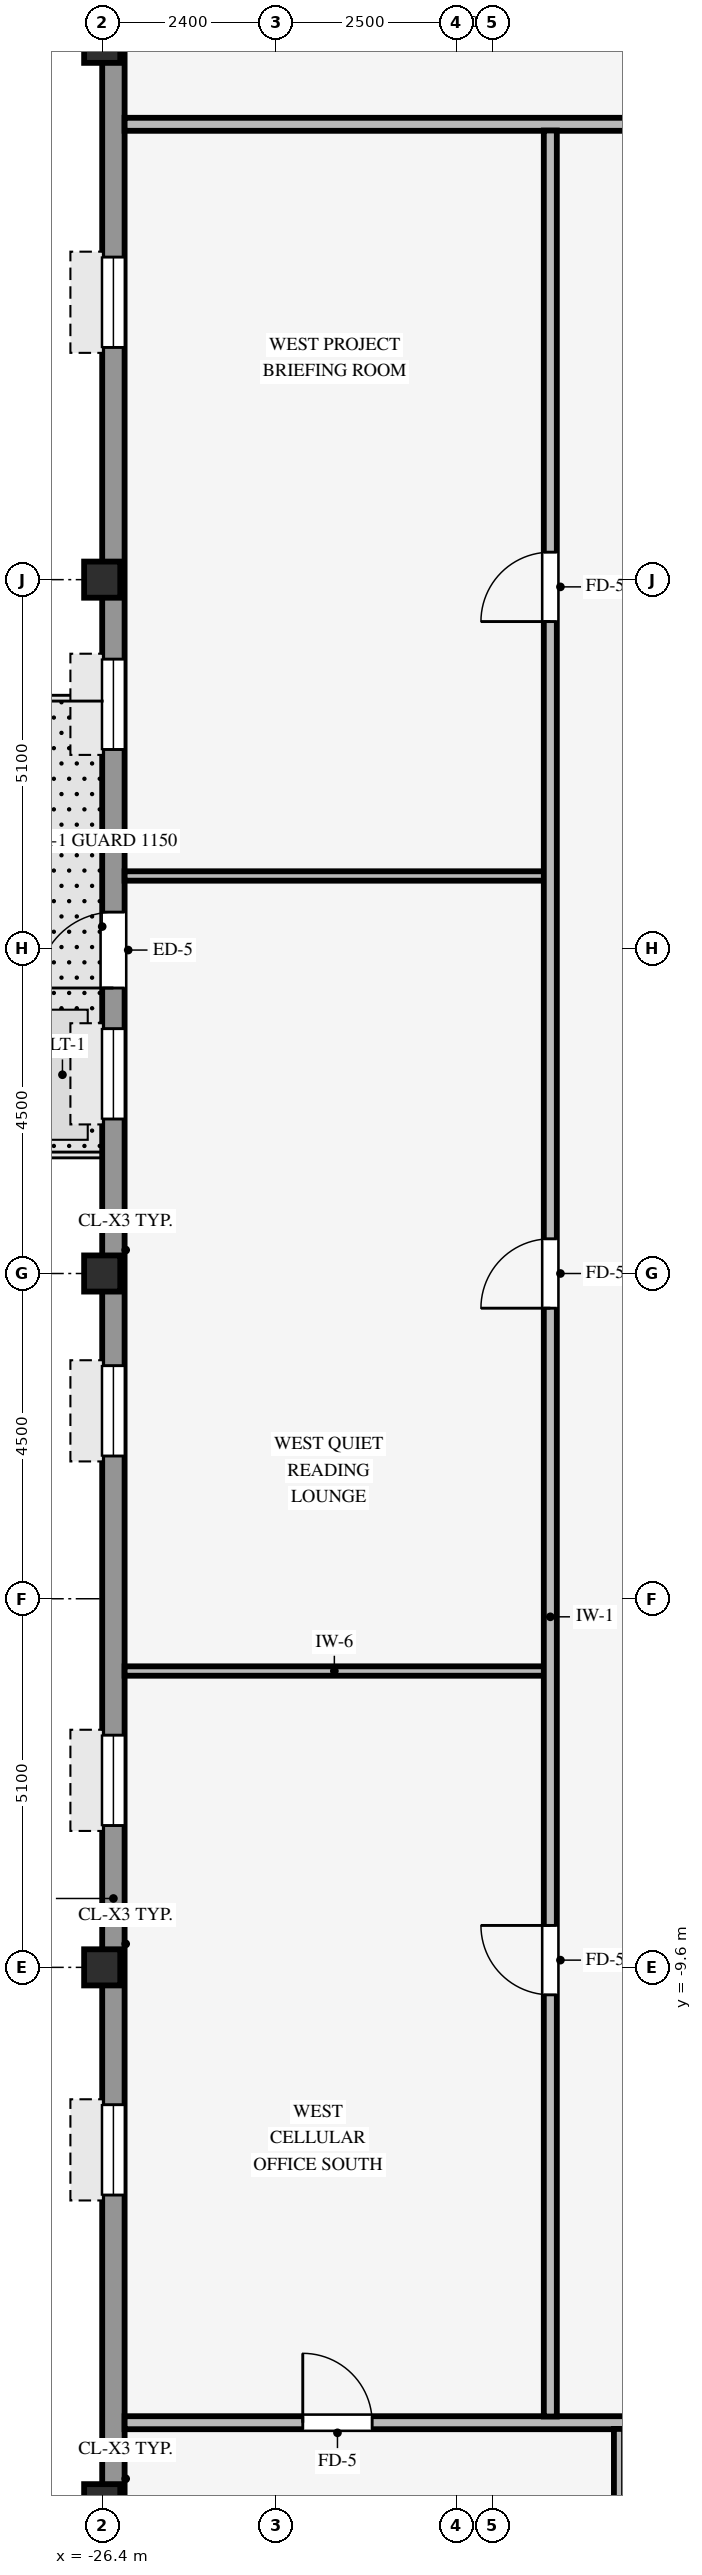
"""IFC4 building model, lengths in metres.
Left out: names, types, materials, properties, quantities, classifications, styles, units other than length and angle.
Written with IfcOpenShell. Run it as: python <this file> out.ifc"""

import sys

from ifc_helpers import new_model, si_unit, direction, frame, frame_2d, origin, origin_2d, place, context, subcontext, project, spatial, rectangle, hollow_rectangle, extrude, source, transform, mapped, element, fill, save


model = new_model("IFC4")
c1 = context("Model", 3, precision=1e-05, world=origin(), true_north=direction((0.0, 1.0)))
c2 = subcontext(c1, "Body", "Model", "MODEL_VIEW")
j1 = project(units=[si_unit("LENGTHUNIT", "METRE"), si_unit("PLANEANGLEUNIT", "RADIAN")], contexts=[c1])
p1 = place(None, origin())
s1 = spatial("IfcSite", under=j1, at=p1, CompositionType="ELEMENT")
p2 = place(p1, origin())
s2 = spatial("IfcBuilding", under=s1, at=p2, CompositionType="ELEMENT")
p3 = place(p2, frame((0.0, 0.0, 190.9)))
s3 = spatial("IfcBuildingStorey", under=s2, at=p3, CompositionType="ELEMENT", Elevation=190.9)
for number, where, z_axis, x_axis in (
    (1, (-26.4, -17.0, 0.0), (0.0, 0.0, 1.0), (1.0, 0.0, 0.0)),
    (2, (-26.4, -9.6, 0.0), (0.0, 0.0, 1.0), (1.0, 0.0, 0.0)),
    (3, (-26.4, 0.0, 0.0), (0.0, 0.0, 1.0), (1.0, 0.0, 0.0)),
    (4, (-26.4, 9.6, 0.0), (0.0, 0.0, 1.0), (1.0, 0.0, 0.0)),
    (5, (-26.4, 17.0, 0.0), (0.0, 0.0, 1.0), (1.0, 0.0, 0.0)),
):
    element("IfcColumn", number, at=place(p3, frame(where, z_axis=z_axis, x_axis=x_axis)), inside=s3, PredefinedType="COLUMN", context=c2, shape_type="SweptSolid", body=[
        extrude(hollow_rectangle(XDim=0.5, YDim=0.5, WallThickness=0.032, InnerFilletRadius=0.032, OuterFilletRadius=0.064, at=origin_2d()), origin(), (0.0, 0.0, 1.0), 3.37),
    ])
p4 = place(p3, frame((-26.245, -20.794, 0.0), z_axis=(0.0, 0.0, 1.0), x_axis=(0.0, 1.0, 0.0)))
e6 = element("IfcWall", 6, at=p4, inside=s3, PredefinedType="STANDARD", context=c2, shape_type="SweptSolid", body=[
    extrude(rectangle(XDim=37.788, YDim=0.31, at=frame_2d((18.894, 0.0))), origin(), (0.0, 0.0, 1.0), 2.705),
])
p5 = place(p4, frame((24.744, 0.0, 0.0)))
e7 = element("IfcOpeningElement", 7, at=p5, cuts=e6, PredefinedType="OPENING", context=c2, shape_type="SweptSolid", body=[
    extrude(rectangle(XDim=1.05, YDim=2.1, at=frame_2d((0.525, 1.05))), frame((0.0, 0.165, 0.0), z_axis=(0.0, -1.0, 0.0), x_axis=(1.0, 0.0, 0.0)), (0.0, 0.0, 1.0), 0.33),
])
p6 = place(p4, frame((1.581, 0.0, 0.8)))
e8 = element("IfcOpeningElement", 8, at=p6, cuts=e6, PredefinedType="OPENING", context=c2, shape_type="SweptSolid", body=[
    extrude(rectangle(XDim=1.25, YDim=1.52, at=frame_2d((0.625, 0.76))), frame((0.0, 0.165, 0.0), z_axis=(0.0, -1.0, 0.0), x_axis=(1.0, 0.0, 0.0)), (0.0, 0.0, 1.0), 0.33),
])
p7 = place(p4, frame((8.044, 0.0, 0.8)))
e9 = element("IfcOpeningElement", 9, at=p7, cuts=e6, PredefinedType="OPENING", context=c2, shape_type="SweptSolid", body=[
    extrude(rectangle(XDim=1.25, YDim=1.52, at=frame_2d((0.625, 0.76))), frame((0.0, 0.165, 0.0), z_axis=(0.0, -1.0, 0.0), x_axis=(1.0, 0.0, 0.0)), (0.0, 0.0, 1.0), 0.33),
])
p8 = place(p4, frame((13.156, 0.0, 0.8)))
e10 = element("IfcOpeningElement", 10, at=p8, cuts=e6, PredefinedType="OPENING", context=c2, shape_type="SweptSolid", body=[
    extrude(rectangle(XDim=1.25, YDim=1.52, at=frame_2d((0.625, 0.76))), frame((0.0, 0.165, 0.0), z_axis=(0.0, -1.0, 0.0), x_axis=(1.0, 0.0, 0.0)), (0.0, 0.0, 1.0), 0.33),
])
p9 = place(p4, frame((18.269, 0.0, 0.8)))
e11 = element("IfcOpeningElement", 11, at=p9, cuts=e6, PredefinedType="OPENING", context=c2, shape_type="SweptSolid", body=[
    extrude(rectangle(XDim=1.25, YDim=1.52, at=frame_2d((0.625, 0.76))), frame((0.0, 0.165, 0.0), z_axis=(0.0, -1.0, 0.0), x_axis=(1.0, 0.0, 0.0)), (0.0, 0.0, 1.0), 0.33),
])
p10 = place(p4, frame((22.932, 0.0, 0.8)))
e12 = element("IfcOpeningElement", 12, at=p10, cuts=e6, PredefinedType="OPENING", context=c2, shape_type="SweptSolid", body=[
    extrude(rectangle(XDim=1.25, YDim=1.52, at=frame_2d((0.625, 0.76))), frame((0.0, 0.165, 0.0), z_axis=(0.0, -1.0, 0.0), x_axis=(1.0, 0.0, 0.0)), (0.0, 0.0, 1.0), 0.33),
])
p11 = place(p4, frame((28.044, 0.0, 0.8)))
e13 = element("IfcOpeningElement", 13, at=p11, cuts=e6, PredefinedType="OPENING", context=c2, shape_type="SweptSolid", body=[
    extrude(rectangle(XDim=1.25, YDim=1.52, at=frame_2d((0.625, 0.76))), frame((0.0, 0.165, 0.0), z_axis=(0.0, -1.0, 0.0), x_axis=(1.0, 0.0, 0.0)), (0.0, 0.0, 1.0), 0.33),
])
p12 = place(p4, frame((33.607, 0.0, 0.8)))
e14 = element("IfcOpeningElement", 14, at=p12, cuts=e6, PredefinedType="OPENING", context=c2, shape_type="SweptSolid", body=[
    extrude(rectangle(XDim=1.25, YDim=1.52, at=frame_2d((0.625, 0.76))), frame((0.0, 0.165, 0.0), z_axis=(0.0, -1.0, 0.0), x_axis=(1.0, 0.0, 0.0)), (0.0, 0.0, 1.0), 0.33),
])
p13 = place(p3, frame((-26.09, -15.9, 0.0), z_axis=(0.0, 0.0, 1.0), x_axis=(1.0, 0.0, 0.0)))
e15 = element("IfcWall", 15, at=p13, inside=s3, PredefinedType="PARTITIONING", context=c2, shape_type="SweptSolid", body=[
    extrude(rectangle(XDim=48.38, YDim=0.18, at=frame_2d((24.19, 0.0))), origin(), (0.0, 0.0, 1.0), 3.36),
])
p14 = place(p13, frame((41.81, 0.0, 0.0)))
e16 = element("IfcOpeningElement", 16, at=p14, cuts=e15, PredefinedType="OPENING", context=c2, shape_type="SweptSolid", body=[
    extrude(rectangle(XDim=0.96, YDim=2.1, at=frame_2d((0.48, 1.05))), frame((0.0, 0.1, 0.0), z_axis=(0.0, -1.0, 0.0), x_axis=(1.0, 0.0, 0.0)), (0.0, 0.0, 1.0), 0.2),
])
p15 = place(p13, frame((17.985, 0.0, 0.0)))
e17 = element("IfcOpeningElement", 17, at=p15, cuts=e15, PredefinedType="OPENING", context=c2, shape_type="SweptSolid", body=[
    extrude(rectangle(XDim=0.96, YDim=2.1, at=frame_2d((0.48, 1.05))), frame((0.0, 0.1, 0.0), z_axis=(0.0, -1.0, 0.0), x_axis=(1.0, 0.0, 0.0)), (0.0, 0.0, 1.0), 0.2),
])
p16 = place(p13, frame((26.55, 0.0, 0.0)))
e18 = element("IfcOpeningElement", 18, at=p16, cuts=e15, PredefinedType="OPENING", context=c2, shape_type="SweptSolid", body=[
    extrude(rectangle(XDim=0.96, YDim=2.1, at=frame_2d((0.48, 1.05))), frame((0.0, 0.1, 0.0), z_axis=(0.0, -1.0, 0.0), x_axis=(1.0, 0.0, 0.0)), (0.0, 0.0, 1.0), 0.2),
])
p17 = place(p13, frame((10.935, 0.0, 0.0)))
e19 = element("IfcOpeningElement", 19, at=p17, cuts=e15, PredefinedType="OPENING", context=c2, shape_type="SweptSolid", body=[
    extrude(rectangle(XDim=0.96, YDim=2.1, at=frame_2d((0.48, 1.05))), frame((0.0, 0.1, 0.0), z_axis=(0.0, -1.0, 0.0), x_axis=(1.0, 0.0, 0.0)), (0.0, 0.0, 1.0), 0.2),
])
p18 = place(p13, frame((35.91, 0.0, 0.0)))
e20 = element("IfcOpeningElement", 20, at=p18, cuts=e15, PredefinedType="OPENING", context=c2, shape_type="SweptSolid", body=[
    extrude(rectangle(XDim=0.96, YDim=2.1, at=frame_2d((0.48, 1.05))), frame((0.0, 0.1, 0.0), z_axis=(0.0, -1.0, 0.0), x_axis=(1.0, 0.0, 0.0)), (0.0, 0.0, 1.0), 0.2),
])
p19 = place(p13, frame((2.465, 0.0, 0.0)))
e21 = element("IfcOpeningElement", 21, at=p19, cuts=e15, PredefinedType="OPENING", context=c2, shape_type="SweptSolid", body=[
    extrude(rectangle(XDim=0.96, YDim=2.1, at=frame_2d((0.48, 1.05))), frame((0.0, 0.1, 0.0), z_axis=(0.0, -1.0, 0.0), x_axis=(1.0, 0.0, 0.0)), (0.0, 0.0, 1.0), 0.2),
])
for number, where, z_axis, x_axis in (
    (22, (-26.09, -5.5, 0.0), (0.0, 0.0, 1.0), (1.0, 0.0, 0.0)),
    (23, (-26.09, 5.5, 0.0), (0.0, 0.0, 1.0), (1.0, 0.0, 0.0)),
):
    element("IfcWall", number, at=place(p3, frame(where, z_axis=z_axis, x_axis=x_axis)), inside=s3, PredefinedType="PARTITIONING", context=c2, shape_type="SweptSolid", body=[
        extrude(rectangle(XDim=5.804, YDim=0.13, at=frame_2d((2.902, 0.0))), origin(), (0.0, 0.0, 1.0), 3.36),
    ])
p20 = place(p3, frame((-26.09, 15.9, 0.0), z_axis=(0.0, 0.0, 1.0), x_axis=(1.0, 0.0, 0.0)))
e24 = element("IfcWall", 24, at=p20, inside=s3, PredefinedType="PARTITIONING", context=c2, shape_type="SweptSolid", body=[
    extrude(rectangle(XDim=48.38, YDim=0.18, at=frame_2d((24.19, 0.0))), origin(), (0.0, 0.0, 1.0), 3.36),
])
p21 = place(p20, frame((14.29, 0.0, 0.0)))
e25 = element("IfcOpeningElement", 25, at=p21, cuts=e24, PredefinedType="OPENING", context=c2, shape_type="SweptSolid", body=[
    extrude(rectangle(XDim=0.96, YDim=2.1, at=frame_2d((0.48, 1.05))), frame((0.0, 0.1, 0.0), z_axis=(0.0, -1.0, 0.0), x_axis=(1.0, 0.0, 0.0)), (0.0, 0.0, 1.0), 0.2),
])
p22 = place(p20, frame((40.51, 0.0, 0.0)))
e26 = element("IfcOpeningElement", 26, at=p22, cuts=e24, PredefinedType="OPENING", context=c2, shape_type="SweptSolid", body=[
    extrude(rectangle(XDim=0.96, YDim=2.1, at=frame_2d((0.48, 1.05))), frame((0.0, 0.1, 0.0), z_axis=(0.0, -1.0, 0.0), x_axis=(1.0, 0.0, 0.0)), (0.0, 0.0, 1.0), 0.2),
])
p23 = place(p3, frame((-20.2, -15.814, 0.0), z_axis=(0.0, 0.0, 1.0), x_axis=(0.0, 1.0, 0.0)))
e27 = element("IfcWall", 27, at=p23, inside=s3, PredefinedType="PARTITIONING", context=c2, shape_type="SweptSolid", body=[
    extrude(rectangle(XDim=31.628, YDim=0.18, at=frame_2d((15.814, 0.0))), origin(), (0.0, 0.0, 1.0), 3.36),
])
p24 = place(p23, frame((15.334, 0.0, 0.0)))
e28 = element("IfcOpeningElement", 28, at=p24, cuts=e27, PredefinedType="OPENING", context=c2, shape_type="SweptSolid", body=[
    extrude(rectangle(XDim=0.96, YDim=2.1, at=frame_2d((0.48, 1.05))), frame((0.0, 0.1, 0.0), z_axis=(0.0, -1.0, 0.0), x_axis=(1.0, 0.0, 0.0)), (0.0, 0.0, 1.0), 0.2),
])
p25 = place(p23, frame((5.834, 0.0, 0.0)))
e29 = element("IfcOpeningElement", 29, at=p25, cuts=e27, PredefinedType="OPENING", context=c2, shape_type="SweptSolid", body=[
    extrude(rectangle(XDim=0.96, YDim=2.1, at=frame_2d((0.48, 1.05))), frame((0.0, 0.1, 0.0), z_axis=(0.0, -1.0, 0.0), x_axis=(1.0, 0.0, 0.0)), (0.0, 0.0, 1.0), 0.2),
])
p26 = place(p23, frame((24.834, 0.0, 0.0)))
e30 = element("IfcOpeningElement", 30, at=p26, cuts=e27, PredefinedType="OPENING", context=c2, shape_type="SweptSolid", body=[
    extrude(rectangle(XDim=0.96, YDim=2.1, at=frame_2d((0.48, 1.05))), frame((0.0, 0.1, 0.0), z_axis=(0.0, -1.0, 0.0), x_axis=(1.0, 0.0, 0.0)), (0.0, 0.0, 1.0), 0.2),
])
p27 = place(p3, frame((-19.25, -22.89, 0.0), z_axis=(0.0, 0.0, 1.0), x_axis=(0.0, 1.0, 0.0)))
e31 = element("IfcWall", 31, at=p27, inside=s3, PredefinedType="PARTITIONING", context=c2, shape_type="SweptSolid", body=[
    extrude(rectangle(XDim=6.904, YDim=0.14, at=frame_2d((3.452, 0.0))), origin(), (0.0, 0.0, 1.0), 3.36),
])
m1 = source(origin(), c2, "Body", "SweptSolid", [
    extrude(rectangle(XDim=1.05, YDim=2.1, at=frame_2d((0.525, 1.05))), frame((0.0, 0.025, 0.0), z_axis=(0.0, -1.0, 0.0), x_axis=(1.0, 0.0, 0.0)), (0.0, 0.0, 1.0), 0.05),
])
p28 = place(p5, origin())
e32 = element("IfcDoor", 32, at=p28, inside=s3, OperationType="SINGLE_SWING_LEFT", PredefinedType="DOOR", context=c2, shape_type="MappedRepresentation", body=[
    mapped(m1, transform((0.0, 0.0, 0.0), scale=1.0)),
])
fill(e7, e32)
m2 = source(origin(), c2, "Body", "SweptSolid", [
    extrude(rectangle(XDim=1.25, YDim=1.52, at=frame_2d((0.625, 0.76))), frame((0.0, 0.03, 0.0), z_axis=(0.0, -1.0, 0.0), x_axis=(1.0, 0.0, 0.0)), (0.0, 0.0, 1.0), 0.06),
])
p29 = place(p7, origin())
e33 = element("IfcWindow", 33, at=p29, inside=s3, PartitioningType="SINGLE_PANEL", PredefinedType="WINDOW", context=c2, shape_type="MappedRepresentation", body=[
    mapped(m2, transform((0.0, 0.0, 0.0), scale=1.0)),
])
fill(e9, e33)
p30 = place(p8, origin())
e34 = element("IfcWindow", 34, at=p30, inside=s3, PartitioningType="SINGLE_PANEL", PredefinedType="WINDOW", context=c2, shape_type="MappedRepresentation", body=[
    mapped(m2, transform((0.0, 0.0, 0.0), scale=1.0)),
])
fill(e10, e34)
p31 = place(p9, origin())
e35 = element("IfcWindow", 35, at=p31, inside=s3, PartitioningType="SINGLE_PANEL", PredefinedType="WINDOW", context=c2, shape_type="MappedRepresentation", body=[
    mapped(m2, transform((0.0, 0.0, 0.0), scale=1.0)),
])
fill(e11, e35)
p32 = place(p10, origin())
e36 = element("IfcWindow", 36, at=p32, inside=s3, PartitioningType="SINGLE_PANEL", PredefinedType="WINDOW", context=c2, shape_type="MappedRepresentation", body=[
    mapped(m2, transform((0.0, 0.0, 0.0), scale=1.0)),
])
fill(e12, e36)
p33 = place(p11, origin())
e37 = element("IfcWindow", 37, at=p33, inside=s3, PartitioningType="SINGLE_PANEL", PredefinedType="WINDOW", context=c2, shape_type="MappedRepresentation", body=[
    mapped(m2, transform((0.0, 0.0, 0.0), scale=1.0)),
])
fill(e13, e37)
p34 = place(p12, origin())
e38 = element("IfcWindow", 38, at=p34, inside=s3, PartitioningType="SINGLE_PANEL", PredefinedType="WINDOW", context=c2, shape_type="MappedRepresentation", body=[
    mapped(m2, transform((0.0, 0.0, 0.0), scale=1.0)),
])
fill(e14, e38)
m3 = source(origin(), c2, "Body", "SweptSolid", [
    extrude(rectangle(XDim=0.96, YDim=2.1, at=frame_2d((0.48, 1.05))), frame((0.0, 0.025, 0.0), z_axis=(0.0, -1.0, 0.0), x_axis=(1.0, 0.0, 0.0)), (0.0, 0.0, 1.0), 0.05),
])
p35 = place(p24, origin())
e39 = element("IfcDoor", 39, at=p35, inside=s3, OperationType="SINGLE_SWING_LEFT", PredefinedType="DOOR", context=c2, shape_type="MappedRepresentation", body=[
    mapped(m3, transform((0.0, 0.0, 0.0), scale=1.0)),
])
fill(e28, e39)
p36 = place(p25, origin())
e40 = element("IfcDoor", 40, at=p36, inside=s3, OperationType="SINGLE_SWING_RIGHT", PredefinedType="DOOR", context=c2, shape_type="MappedRepresentation", body=[
    mapped(m3, transform((0.0, 0.0, 0.0), scale=1.0)),
])
fill(e29, e40)
p37 = place(p26, origin())
e41 = element("IfcDoor", 41, at=p37, inside=s3, OperationType="SINGLE_SWING_LEFT", PredefinedType="DOOR", context=c2, shape_type="MappedRepresentation", body=[
    mapped(m3, transform((0.0, 0.0, 0.0), scale=1.0)),
])
fill(e30, e41)
p38 = place(p19, origin())
e42 = element("IfcDoor", 42, at=p38, inside=s3, OperationType="SINGLE_SWING_LEFT", PredefinedType="DOOR", context=c2, shape_type="MappedRepresentation", body=[
    mapped(m3, transform((0.0, 0.0, 0.0), scale=1.0)),
])
fill(e21, e42)
save(model, sys.argv[1])
